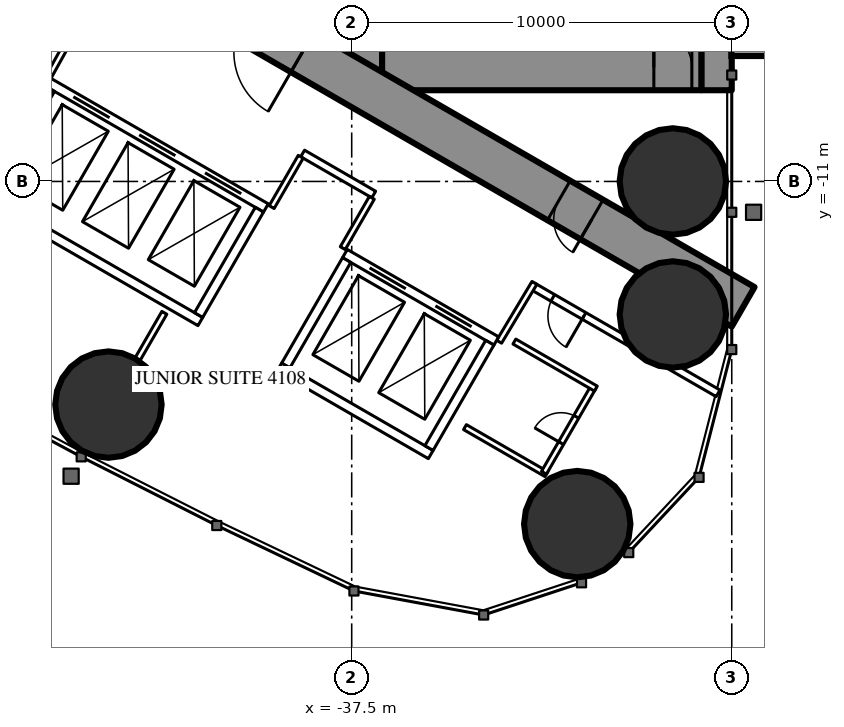
"""IFC4 building model, lengths in metres.
Left out: names, types, materials, properties, quantities, classifications, styles, units other than length and angle.
Written with IfcOpenShell. Run it as: python <this file> out.ifc"""

import sys

from ifc_helpers import new_model, si_unit, direction, frame, frame_2d, origin, origin_2d, place, context, subcontext, project, spatial, rectangle, circle, extrude, element, fill, save


model = new_model("IFC4")
c1 = context("Model", 3, precision=1e-05, world=origin(), true_north=direction((0.0, 1.0)))
c2 = subcontext(c1, "Body", "Model", "MODEL_VIEW")
j1 = project(units=[si_unit("LENGTHUNIT", "METRE"), si_unit("PLANEANGLEUNIT", "RADIAN")], contexts=[c1])
p1 = place(None, origin())
s1 = spatial("IfcSite", under=j1, at=p1, CompositionType="ELEMENT")
p2 = place(p1, origin())
s2 = spatial("IfcBuilding", under=s1, at=p2, CompositionType="ELEMENT")
p3 = place(p2, frame((0.0, 0.0, 156.3)))
s3 = spatial("IfcBuildingStorey", under=s2, at=p3, CompositionType="ELEMENT", Elevation=156.3)
for number, where, z_axis, x_axis in (
    (1, (-31.565, -20.016, 0.0), (0.0, 0.0, 1.0), (1.0, 0.0, 0.0)),
    (2, (-29.05, -11.0, 0.0), (0.0, 0.0, 1.0), (1.0, 0.0, 0.0)),
    (3, (-29.05, -14.5, 0.0), (0.0, 0.0, 1.0), (1.0, 0.0, 0.0)),
    (4, (-43.9, -16.871, 0.0), (0.0, 0.0, 1.0), (1.0, 0.0, 0.0)),
):
    element("IfcColumn", number, at=place(p3, frame(where, z_axis=z_axis, x_axis=x_axis)), inside=s3, PredefinedType="COLUMN", context=c2, shape_type="SweptSolid", body=[
        extrude(circle(Radius=1.4, at=origin_2d()), origin(), (0.0, 0.0, 1.0), 3.5),
    ])
p4 = place(p3, frame((-27.9, 8.6, 0.0), z_axis=(0.0, 0.0, 1.0), x_axis=(0.0, -1.0, 0.0)))
e5 = element("IfcWall", 5, at=p4, inside=s3, PredefinedType="SHEAR", context=c2, shape_type="SweptSolid", body=[
    extrude(rectangle(XDim=17.2, YDim=0.8, at=frame_2d((8.6, 0.0))), origin(), (0.0, 0.0, 1.0), 3.5),
])
p5 = place(p4, frame((2.45, 0.0, 0.6)))
e6 = element("IfcOpeningElement", 6, at=p5, cuts=e5, PredefinedType="OPENING", context=c2, shape_type="SweptSolid", body=[
    extrude(rectangle(XDim=0.6, YDim=2.1, at=frame_2d((0.3, 1.05))), frame((0.0, 0.41, 0.0), z_axis=(0.0, -1.0, 0.0), x_axis=(1.0, 0.0, 0.0)), (0.0, 0.0, 1.0), 0.82),
])
p6 = place(p4, frame((14.15, 0.0, 0.6)))
e7 = element("IfcOpeningElement", 7, at=p6, cuts=e5, PredefinedType="OPENING", context=c2, shape_type="SweptSolid", body=[
    extrude(rectangle(XDim=0.6, YDim=2.1, at=frame_2d((0.3, 1.05))), frame((0.0, 0.41, 0.0), z_axis=(0.0, -1.0, 0.0), x_axis=(1.0, 0.0, 0.0)), (0.0, 0.0, 1.0), 0.82),
])
p7 = place(p3, frame((-37.3, 8.6, 0.0), z_axis=(0.0, 0.0, 1.0), x_axis=(0.0, -1.0, 0.0)))
e8 = element("IfcWall", 8, at=p7, inside=s3, PredefinedType="SHEAR", context=c2, shape_type="SweptSolid", body=[
    extrude(rectangle(XDim=17.2, YDim=1.2, at=frame_2d((8.6, 0.0))), origin(), (0.0, 0.0, 1.0), 3.5),
])
p8 = place(p7, frame((7.7, 0.0, 0.0)))
e9 = element("IfcOpeningElement", 9, at=p8, cuts=e8, PredefinedType="OPENING", context=c2, shape_type="SweptSolid", body=[
    extrude(rectangle(XDim=1.8, YDim=2.2, at=frame_2d((0.9, 1.1))), frame((0.0, 0.61, 0.0), z_axis=(0.0, -1.0, 0.0), x_axis=(1.0, 0.0, 0.0)), (0.0, 0.0, 1.0), 1.22),
])
p9 = place(p3, frame((-28.3, -8.0, 0.0), z_axis=(0.0, 0.0, 1.0), x_axis=(-1.0, 0.0, 0.0)))
e10 = element("IfcWall", 10, at=p9, inside=s3, PredefinedType="SHEAR", context=c2, shape_type="SweptSolid", body=[
    extrude(rectangle(XDim=8.4, YDim=1.2, at=frame_2d((4.2, 0.0))), origin(), (0.0, 0.0, 1.0), 3.5),
])
p10 = place(p9, frame((0.25, 0.0, 0.0)))
e11 = element("IfcOpeningElement", 11, at=p10, cuts=e10, PredefinedType="OPENING", context=c2, shape_type="SweptSolid", body=[
    extrude(rectangle(XDim=1.0, YDim=2.2, at=frame_2d((0.5, 1.1))), frame((0.0, 0.61, 0.0), z_axis=(0.0, -1.0, 0.0), x_axis=(1.0, 0.0, 0.0)), (0.0, 0.0, 1.0), 1.22),
])
p11 = place(p3, frame((-27.2, -14.3, 0.0), z_axis=(0.0, 0.0, 1.0), x_axis=(-0.866024021859, 0.500002393557, 0.0)))
e12 = element("IfcWall", 12, at=p11, inside=s3, PredefinedType="SHEAR", context=c2, shape_type="SweptSolid", body=[
    extrude(rectangle(XDim=27.907, YDim=1.2, at=frame_2d((13.954, 0.0))), origin(), (0.0, 0.0, 1.0), 3.5),
])
p12 = place(p11, frame((4.6, 0.0, 0.0)))
e13 = element("IfcOpeningElement", 13, at=p12, cuts=e12, PredefinedType="OPENING", context=c2, shape_type="SweptSolid", body=[
    extrude(rectangle(XDim=1.0, YDim=2.2, at=frame_2d((0.5, 1.1))), frame((0.0, 0.61, 0.0), z_axis=(0.0, -1.0, 0.0), x_axis=(1.0, 0.0, 0.0)), (0.0, 0.0, 1.0), 1.22),
])
p13 = place(p11, frame((13.395, 0.0, 0.0)))
e14 = element("IfcOpeningElement", 14, at=p13, cuts=e12, PredefinedType="OPENING", context=c2, shape_type="SweptSolid", body=[
    extrude(rectangle(XDim=1.8, YDim=2.2, at=frame_2d((0.9, 1.1))), frame((0.0, 0.61, 0.0), z_axis=(0.0, -1.0, 0.0), x_axis=(1.0, 0.0, 0.0)), (0.0, 0.0, 1.0), 1.22),
])
p14 = place(p3, frame((-42.429, -14.457, 0.0), z_axis=(0.0, 0.0, 1.0), x_axis=(-0.5000578829, -0.865991982497, 0.0)))
e15 = element("IfcWall", 15, at=p14, inside=s3, PredefinedType="PARTITIONING", context=c2, shape_type="SweptSolid", body=[
    extrude(rectangle(XDim=1.407, YDim=0.15, at=frame_2d((0.704, 0.0))), origin(), (0.0, 0.0, 1.0), 3.25),
])
p15 = place(p3, frame((-27.86, -16.575, 0.0), z_axis=(0.0, 0.0, 1.0), x_axis=(-0.866019269751, 0.500010624307, 0.0)))
e16 = element("IfcWall", 16, at=p15, inside=s3, PredefinedType="PARTITIONING", context=c2, shape_type="SweptSolid", body=[
    extrude(rectangle(XDim=5.623, YDim=0.2, at=frame_2d((2.811, 0.0))), origin(), (0.0, 0.0, 1.0), 3.25),
])
p16 = place(p15, frame((4.073, 0.0, 0.0)))
e17 = element("IfcOpeningElement", 17, at=p16, cuts=e16, PredefinedType="OPENING", context=c2, shape_type="SweptSolid", body=[
    extrude(rectangle(XDim=0.95, YDim=2.2, at=frame_2d((0.475, 1.1))), frame((0.0, 0.11, 0.0), z_axis=(0.0, -1.0, 0.0), x_axis=(1.0, 0.0, 0.0)), (0.0, 0.0, 1.0), 0.22),
])
p17 = place(p3, frame((-36.92, -11.344, 0.0), z_axis=(0.0, 0.0, 1.0), x_axis=(-0.866065156741, 0.499931139538, 0.0)))
e18 = element("IfcWall", 18, at=p17, inside=s3, PredefinedType="PARTITIONING", context=c2, shape_type="SweptSolid", body=[
    extrude(rectangle(XDim=2.16, YDim=0.2, at=frame_2d((1.08, 0.0))), origin(), (0.0, 0.0, 1.0), 3.25),
])
for number, where, z_axis, x_axis in (
    (19, (-33.621, -15.218, 0.0), (0.0, 0.0, 1.0), (0.514, 0.858, 0.0)),
    (20, (-44.652, -6.764, 0.0), (0.0, 0.0, 1.0), (-0.485, -0.874, 0.0)),
):
    element("IfcWall", number, at=place(p3, frame(where, z_axis=z_axis, x_axis=x_axis)), inside=s3, PredefinedType="PARTITIONING", context=c2, shape_type="SweptSolid", body=[
        extrude(rectangle(XDim=1.805, YDim=0.15, at=frame_2d((0.903, 0.0))), origin(), (0.0, 0.0, 1.0), 3.25),
    ])
p18 = place(p3, frame((-36.97, -11.43, 0.0), z_axis=(0.0, 0.0, 1.0), x_axis=(-0.499985008713, -0.866034058835, 0.0)))
e21 = element("IfcWall", 21, at=p18, inside=s3, PredefinedType="PARTITIONING", context=c2, shape_type="SweptSolid", body=[
    extrude(rectangle(XDim=1.529, YDim=0.15, at=frame_2d((0.765, 0.0))), origin(), (0.0, 0.0, 1.0), 3.25),
])
p19 = place(p3, frame((-38.841, -10.35, 0.0), z_axis=(0.0, 0.0, 1.0), x_axis=(-0.499966498333, -0.866044745117, 0.0)))
e22 = element("IfcWall", 22, at=p19, inside=s3, PredefinedType="PARTITIONING", context=c2, shape_type="SweptSolid", body=[
    extrude(rectangle(XDim=1.53, YDim=0.15, at=frame_2d((0.765, 0.0))), origin(), (0.0, 0.0, 1.0), 3.25),
])
p20 = place(p3, frame((-32.376, -18.702, 0.0), z_axis=(0.0, 0.0, 1.0), x_axis=(-0.866006523861, 0.500032699561, 0.0)))
e23 = element("IfcWall", 23, at=p20, inside=s3, PredefinedType="PARTITIONING", context=c2, shape_type="SweptSolid", body=[
    extrude(rectangle(XDim=2.475, YDim=0.15, at=frame_2d((1.237, 0.0))), origin(), (0.0, 0.0, 1.0), 3.25),
])
p21 = place(p3, frame((-31.141, -16.413, 0.0), z_axis=(0.0, 0.0, 1.0), x_axis=(-0.500006934395, -0.866021400173, 0.0)))
e24 = element("IfcWall", 24, at=p21, inside=s3, PredefinedType="PARTITIONING", context=c2, shape_type="SweptSolid", body=[
    extrude(rectangle(XDim=2.6, YDim=0.15, at=frame_2d((1.3, 0.0))), origin(), (0.0, 0.0, 1.0), 3.25),
])
p22 = place(p21, frame((0.9, 0.0, 0.0)))
e25 = element("IfcOpeningElement", 25, at=p22, cuts=e24, PredefinedType="OPENING", context=c2, shape_type="SweptSolid", body=[
    extrude(rectangle(XDim=0.8, YDim=2.2, at=frame_2d((0.4, 1.1))), frame((0.0, 0.085, 0.0), z_axis=(0.0, -1.0, 0.0), x_axis=(1.0, 0.0, 0.0)), (0.0, 0.0, 1.0), 0.17),
])
p23 = place(p3, frame((-31.076, -16.45, 0.0), z_axis=(0.0, 0.0, 1.0), x_axis=(-0.866073894602, 0.499916002032, 0.0)))
e26 = element("IfcWall", 26, at=p23, inside=s3, PredefinedType="PARTITIONING", context=c2, shape_type="SweptSolid", body=[
    extrude(rectangle(XDim=2.475, YDim=0.15, at=frame_2d((1.238, 0.0))), origin(), (0.0, 0.0, 1.0), 2.45),
])
p24 = place(p3, frame((-33.696, -15.197, 0.0), z_axis=(0.0, 0.0, 1.0), x_axis=(-0.865976953817, 0.500083908417, 0.0)))
e27 = element("IfcWall", 27, at=p24, inside=s3, PredefinedType="PARTITIONING", context=c2, shape_type="SweptSolid", body=[
    extrude(rectangle(XDim=4.599, YDim=0.25, at=frame_2d((2.3, 0.0))), origin(), (0.0, 0.0, 1.0), 3.25),
])
p25 = place(p24, frame((0.75, 0.0, 0.0)))
e28 = element("IfcOpeningElement", 28, at=p25, cuts=e27, PredefinedType="OPENING", context=c2, shape_type="SweptSolid", body=[
    extrude(rectangle(XDim=1.1, YDim=2.2, at=frame_2d((0.55, 1.1))), frame((0.0, 0.135, 0.0), z_axis=(0.0, -1.0, 0.0), x_axis=(1.0, 0.0, 0.0)), (0.0, 0.0, 1.0), 0.27),
])
p26 = place(p24, frame((2.75, 0.0, 0.0)))
e29 = element("IfcOpeningElement", 29, at=p26, cuts=e27, PredefinedType="OPENING", context=c2, shape_type="SweptSolid", body=[
    extrude(rectangle(XDim=1.1, YDim=2.2, at=frame_2d((0.55, 1.1))), frame((0.0, 0.135, 0.0), z_axis=(0.0, -1.0, 0.0), x_axis=(1.0, 0.0, 0.0)), (0.0, 0.0, 1.0), 0.27),
])
p27 = place(p3, frame((-35.42, -18.186, 0.0), z_axis=(0.0, 0.0, 1.0), x_axis=(-0.865990227814, 0.50006092162, 0.0)))
e30 = element("IfcWall", 30, at=p27, inside=s3, PredefinedType="PARTITIONING", context=c2, shape_type="SweptSolid", body=[
    extrude(rectangle(XDim=4.6, YDim=0.25, at=frame_2d((2.3, 0.0))), origin(), (0.0, 0.0, 1.0), 3.25),
])
p28 = place(p3, frame((-33.866, -15.243, 0.0), z_axis=(0.0, 0.0, 1.0), x_axis=(-0.499929347863, -0.866066190972, 0.0)))
e31 = element("IfcWall", 31, at=p28, inside=s3, PredefinedType="PARTITIONING", context=c2, shape_type="SweptSolid", body=[
    extrude(rectangle(XDim=3.201, YDim=0.25, at=frame_2d((1.6, 0.0))), origin(), (0.0, 0.0, 1.0), 3.25),
])
p29 = place(p3, frame((-37.633, -13.068, 0.0), z_axis=(0.0, 0.0, 1.0), x_axis=(-0.499872130319, -0.866099216793, 0.0)))
e32 = element("IfcWall", 32, at=p29, inside=s3, PredefinedType="PARTITIONING", context=c2, shape_type="SweptSolid", body=[
    extrude(rectangle(XDim=3.2, YDim=0.25, at=frame_2d((1.6, 0.0))), origin(), (0.0, 0.0, 1.0), 3.25),
])
p30 = place(p3, frame((-39.758, -11.697, 0.0), z_axis=(0.0, 0.0, 1.0), x_axis=(-0.866024194504, 0.500002094529, 0.0)))
e33 = element("IfcWall", 33, at=p30, inside=s3, PredefinedType="PARTITIONING", context=c2, shape_type="SweptSolid", body=[
    extrude(rectangle(XDim=6.6, YDim=0.25, at=frame_2d((3.3, 0.0))), origin(), (0.0, 0.0, 1.0), 3.25),
])
p31 = place(p30, frame((0.75, 0.0, 0.0)))
e34 = element("IfcOpeningElement", 34, at=p31, cuts=e33, PredefinedType="OPENING", context=c2, shape_type="SweptSolid", body=[
    extrude(rectangle(XDim=1.1, YDim=2.2, at=frame_2d((0.55, 1.1))), frame((0.0, 0.135, 0.0), z_axis=(0.0, -1.0, 0.0), x_axis=(1.0, 0.0, 0.0)), (0.0, 0.0, 1.0), 0.27),
])
p32 = place(p30, frame((2.75, 0.0, 0.0)))
e35 = element("IfcOpeningElement", 35, at=p32, cuts=e33, PredefinedType="OPENING", context=c2, shape_type="SweptSolid", body=[
    extrude(rectangle(XDim=1.1, YDim=2.2, at=frame_2d((0.55, 1.1))), frame((0.0, 0.135, 0.0), z_axis=(0.0, -1.0, 0.0), x_axis=(1.0, 0.0, 0.0)), (0.0, 0.0, 1.0), 0.27),
])
p33 = place(p30, frame((4.75, 0.0, 0.0)))
e36 = element("IfcOpeningElement", 36, at=p33, cuts=e33, PredefinedType="OPENING", context=c2, shape_type="SweptSolid", body=[
    extrude(rectangle(XDim=1.1, YDim=2.2, at=frame_2d((0.55, 1.1))), frame((0.0, 0.135, 0.0), z_axis=(0.0, -1.0, 0.0), x_axis=(1.0, 0.0, 0.0)), (0.0, 0.0, 1.0), 0.27),
])
p34 = place(p3, frame((-41.482, -14.686, 0.0), z_axis=(0.0, 0.0, 1.0), x_axis=(-0.86603344179, 0.499986077507, 0.0)))
e37 = element("IfcWall", 37, at=p34, inside=s3, PredefinedType="PARTITIONING", context=c2, shape_type="SweptSolid", body=[
    extrude(rectangle(XDim=6.6, YDim=0.25, at=frame_2d((3.3, 0.0))), origin(), (0.0, 0.0, 1.0), 3.25),
])
for number, where, z_axis, x_axis in (
    (38, (-39.928, -11.743, 0.0), (0.0, 0.0, 1.0), (-0.5, -0.866, 0.0)),
    (39, (-45.428, -8.568, 0.0), (0.0, 0.0, 1.0), (-0.5, -0.866, 0.0)),
):
    element("IfcWall", number, at=place(p3, frame(where, z_axis=z_axis, x_axis=x_axis)), inside=s3, PredefinedType="PARTITIONING", context=c2, shape_type="SweptSolid", body=[
        extrude(rectangle(XDim=3.201, YDim=0.25, at=frame_2d((1.6, 0.0))), origin(), (0.0, 0.0, 1.0), 3.25),
    ])
p35 = place(p22, origin())
e40 = element("IfcDoor", 40, at=p35, inside=s3, OperationType="SINGLE_SWING_RIGHT", PredefinedType="DOOR", context=c2, shape_type="SweptSolid", body=[
    extrude(rectangle(XDim=0.8, YDim=2.2, at=frame_2d((0.4, 1.1))), frame((0.0, 0.025, 0.0), z_axis=(0.0, -1.0, 0.0), x_axis=(1.0, 0.0, 0.0)), (0.0, 0.0, 1.0), 0.05),
])
fill(e25, e40)
p36 = place(p16, origin())
e41 = element("IfcDoor", 41, at=p36, inside=s3, OperationType="SINGLE_SWING_LEFT", PredefinedType="DOOR", context=c2, shape_type="SweptSolid", body=[
    extrude(rectangle(XDim=0.95, YDim=2.2, at=frame_2d((0.475, 1.1))), frame((0.0, 0.025, 0.0), z_axis=(0.0, -1.0, 0.0), x_axis=(1.0, 0.0, 0.0)), (0.0, 0.0, 1.0), 0.05),
])
fill(e17, e41)
p37 = place(p12, origin())
e42 = element("IfcDoor", 42, at=p37, inside=s3, OperationType="SINGLE_SWING_LEFT", PredefinedType="DOOR", context=c2, shape_type="SweptSolid", body=[
    extrude(rectangle(XDim=1.0, YDim=2.2, at=frame_2d((0.5, 1.1))), frame((0.0, 0.025, 0.0), z_axis=(0.0, -1.0, 0.0), x_axis=(1.0, 0.0, 0.0)), (0.0, 0.0, 1.0), 0.05),
])
fill(e13, e42)
p38 = place(p13, origin())
e43 = element("IfcDoor", 43, at=p38, inside=s3, OperationType="DOUBLE_DOOR_SINGLE_SWING", PredefinedType="DOOR", context=c2, shape_type="SweptSolid", body=[
    extrude(rectangle(XDim=1.8, YDim=2.2, at=frame_2d((0.9, 1.1))), frame((0.0, 0.025, 0.0), z_axis=(0.0, -1.0, 0.0), x_axis=(1.0, 0.0, 0.0)), (0.0, 0.0, 1.0), 0.05),
])
fill(e14, e43)
p39 = place(p10, origin())
e44 = element("IfcDoor", 44, at=p39, inside=s3, OperationType="SINGLE_SWING_RIGHT", PredefinedType="DOOR", context=c2, shape_type="SweptSolid", body=[
    extrude(rectangle(XDim=1.0, YDim=2.2, at=frame_2d((0.5, 1.1))), frame((0.0, 0.025, 0.0), z_axis=(0.0, -1.0, 0.0), x_axis=(1.0, 0.0, 0.0)), (0.0, 0.0, 1.0), 0.05),
])
fill(e11, e44)
p40 = place(p25, origin())
e45 = element("IfcDoor", 45, at=p40, inside=s3, OperationType="DOUBLE_DOOR_SLIDING", PredefinedType="USERDEFINED", context=c2, shape_type="SweptSolid", body=[
    extrude(rectangle(XDim=1.1, YDim=2.2, at=frame_2d((0.55, 1.1))), frame((0.0, 0.025, 0.0), z_axis=(0.0, -1.0, 0.0), x_axis=(1.0, 0.0, 0.0)), (0.0, 0.0, 1.0), 0.05),
])
fill(e28, e45)
p41 = place(p26, origin())
e46 = element("IfcDoor", 46, at=p41, inside=s3, OperationType="DOUBLE_DOOR_SLIDING", PredefinedType="USERDEFINED", context=c2, shape_type="SweptSolid", body=[
    extrude(rectangle(XDim=1.1, YDim=2.2, at=frame_2d((0.55, 1.1))), frame((0.0, 0.025, 0.0), z_axis=(0.0, -1.0, 0.0), x_axis=(1.0, 0.0, 0.0)), (0.0, 0.0, 1.0), 0.05),
])
fill(e29, e46)
p42 = place(p31, origin())
e47 = element("IfcDoor", 47, at=p42, inside=s3, OperationType="DOUBLE_DOOR_SLIDING", PredefinedType="USERDEFINED", context=c2, shape_type="SweptSolid", body=[
    extrude(rectangle(XDim=1.1, YDim=2.2, at=frame_2d((0.55, 1.1))), frame((0.0, 0.025, 0.0), z_axis=(0.0, -1.0, 0.0), x_axis=(1.0, 0.0, 0.0)), (0.0, 0.0, 1.0), 0.05),
])
fill(e34, e47)
p43 = place(p32, origin())
e48 = element("IfcDoor", 48, at=p43, inside=s3, OperationType="DOUBLE_DOOR_SLIDING", PredefinedType="USERDEFINED", context=c2, shape_type="SweptSolid", body=[
    extrude(rectangle(XDim=1.1, YDim=2.2, at=frame_2d((0.55, 1.1))), frame((0.0, 0.025, 0.0), z_axis=(0.0, -1.0, 0.0), x_axis=(1.0, 0.0, 0.0)), (0.0, 0.0, 1.0), 0.05),
])
fill(e35, e48)
p44 = place(p33, origin())
e49 = element("IfcDoor", 49, at=p44, inside=s3, OperationType="DOUBLE_DOOR_SLIDING", PredefinedType="USERDEFINED", context=c2, shape_type="SweptSolid", body=[
    extrude(rectangle(XDim=1.1, YDim=2.2, at=frame_2d((0.55, 1.1))), frame((0.0, 0.025, 0.0), z_axis=(0.0, -1.0, 0.0), x_axis=(1.0, 0.0, 0.0)), (0.0, 0.0, 1.0), 0.05),
])
fill(e36, e49)
save(model, sys.argv[1])
